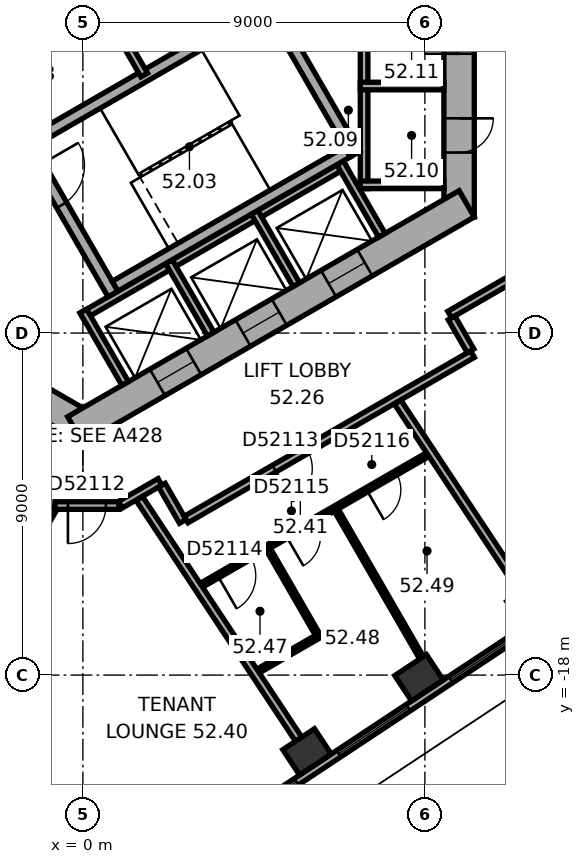
"""IFC4 building model, lengths in metres.
Left out: names, types, materials, properties, quantities, classifications, styles, units other than length and angle.
Written with IfcOpenShell. Run it as: python <this file> out.ifc"""

import sys

from ifc_helpers import new_model, si_unit, direction, frame, frame_2d, origin, origin_2d, place, context, subcontext, project, spatial, rectangle, extrude, element, fill, save


model = new_model("IFC4")
c1 = context("Model", 3, precision=1e-05, world=origin(), true_north=direction((0.0, 1.0)))
c2 = subcontext(c1, "Body", "Model", "MODEL_VIEW")
j1 = project(units=[si_unit("LENGTHUNIT", "METRE"), si_unit("PLANEANGLEUNIT", "RADIAN")], contexts=[c1])
p1 = place(None, origin())
s1 = spatial("IfcSite", under=j1, at=p1, CompositionType="ELEMENT")
p2 = place(p1, origin())
s2 = spatial("IfcBuilding", under=s1, at=p2, CompositionType="ELEMENT")
p3 = place(p2, frame((0.0, 0.0, 210.6)))
s3 = spatial("IfcBuildingStorey", under=s2, at=p3, CompositionType="ELEMENT", Elevation=210.6)
for number, where, z_axis, x_axis in (
    (1, (5.898, -20.021, 0.0), (0.0, 0.0, 1.0), (0.834, 0.552, 0.0)),
    (2, (8.844, -18.07, 0.0), (0.0, 0.0, 1.0), (0.834, 0.552, 0.0)),
):
    element("IfcColumn", number, at=place(p3, frame(where, z_axis=z_axis, x_axis=x_axis)), inside=s3, PredefinedType="COLUMN", context=c2, shape_type="SweptSolid", body=[
        extrude(rectangle(XDim=1.0, YDim=0.8, at=origin_2d()), origin(), (0.0, 0.0, 1.0), 3.7),
    ])
p4 = place(p3, frame((9.9, -5.947, 0.0), z_axis=(0.0, 0.0, 1.0), x_axis=(0.0, 1.0, 0.0)))
e3 = element("IfcWall", 3, at=p4, inside=s3, PredefinedType="SHEAR", context=c2, shape_type="SweptSolid", body=[
    extrude(rectangle(XDim=11.894, YDim=0.8, at=frame_2d((5.947, 0.0))), origin(), (0.0, 0.0, 1.0), 3.7),
])
p5 = place(p4, frame((6.147, 0.0, 0.0)))
e4 = element("IfcOpeningElement", 4, at=p5, cuts=e3, PredefinedType="OPENING", context=c2, shape_type="SweptSolid", body=[
    extrude(rectangle(XDim=1.5, YDim=2.1, at=frame_2d((0.75, 1.05))), frame((0.0, 0.41, 0.0), z_axis=(0.0, -1.0, 0.0), x_axis=(1.0, 0.0, 0.0)), (0.0, 0.0, 1.0), 0.82),
])
p6 = place(p4, frame((1.697, 0.0, 0.0)))
e5 = element("IfcOpeningElement", 5, at=p6, cuts=e3, PredefinedType="OPENING", context=c2, shape_type="SweptSolid", body=[
    extrude(rectangle(XDim=0.9, YDim=2.1, at=frame_2d((0.45, 1.05))), frame((0.0, 0.41, 0.0), z_axis=(0.0, -1.0, 0.0), x_axis=(1.0, 0.0, 0.0)), (0.0, 0.0, 1.0), 0.82),
])
p7 = place(p4, frame((4.297, 0.0, 0.0)))
e6 = element("IfcOpeningElement", 6, at=p7, cuts=e3, PredefinedType="OPENING", context=c2, shape_type="SweptSolid", body=[
    extrude(rectangle(XDim=0.9, YDim=2.1, at=frame_2d((0.45, 1.05))), frame((0.0, 0.41, 0.0), z_axis=(0.0, -1.0, 0.0), x_axis=(1.0, 0.0, 0.0)), (0.0, 0.0, 1.0), 0.82),
])
p8 = place(p3, frame((-10.1, -5.6, 0.0), z_axis=(0.0, 0.0, 1.0), x_axis=(0.866023897231, -0.500002609418, 0.0)))
e7 = element("IfcWall", 7, at=p8, inside=s3, PredefinedType="SHEAR", context=c2, shape_type="SweptSolid", body=[
    extrude(rectangle(XDim=11.894, YDim=0.8, at=frame_2d((5.947, 0.0))), origin(), (0.0, 0.0, 1.0), 3.7),
])
p9 = place(p8, frame((6.147, 0.0, 0.0)))
e8 = element("IfcOpeningElement", 8, at=p9, cuts=e7, PredefinedType="OPENING", context=c2, shape_type="SweptSolid", body=[
    extrude(rectangle(XDim=1.5, YDim=2.1, at=frame_2d((0.75, 1.05))), frame((0.0, 0.41, 0.0), z_axis=(0.0, -1.0, 0.0), x_axis=(1.0, 0.0, 0.0)), (0.0, 0.0, 1.0), 0.82),
])
p10 = place(p8, frame((1.597, 0.0, 0.0)))
e9 = element("IfcOpeningElement", 9, at=p10, cuts=e7, PredefinedType="OPENING", context=c2, shape_type="SweptSolid", body=[
    extrude(rectangle(XDim=1.1, YDim=2.1, at=frame_2d((0.55, 1.05))), frame((0.0, 0.41, 0.0), z_axis=(0.0, -1.0, 0.0), x_axis=(1.0, 0.0, 0.0)), (0.0, 0.0, 1.0), 0.82),
])
p11 = place(p8, frame((4.197, 0.0, 0.0)))
e10 = element("IfcOpeningElement", 10, at=p11, cuts=e7, PredefinedType="OPENING", context=c2, shape_type="SweptSolid", body=[
    extrude(rectangle(XDim=1.1, YDim=2.1, at=frame_2d((0.55, 1.05))), frame((0.0, 0.41, 0.0), z_axis=(0.0, -1.0, 0.0), x_axis=(1.0, 0.0, 0.0)), (0.0, 0.0, 1.0), 0.82),
])
p12 = place(p3, frame((-0.2, -11.547, 0.0), z_axis=(0.0, 0.0, 1.0), x_axis=(0.866023897231, 0.500002609418, 0.0)))
e11 = element("IfcWall", 11, at=p12, inside=s3, PredefinedType="SHEAR", context=c2, shape_type="SweptSolid", body=[
    extrude(rectangle(XDim=11.894, YDim=0.8, at=frame_2d((5.947, 0.0))), origin(), (0.0, 0.0, 1.0), 3.7),
])
p13 = place(p12, frame((2.497, 0.0, 0.0)))
e12 = element("IfcOpeningElement", 12, at=p13, cuts=e11, PredefinedType="OPENING", context=c2, shape_type="SweptSolid", body=[
    extrude(rectangle(XDim=1.1, YDim=2.1, at=frame_2d((0.55, 1.05))), frame((0.0, 0.41, 0.0), z_axis=(0.0, -1.0, 0.0), x_axis=(1.0, 0.0, 0.0)), (0.0, 0.0, 1.0), 0.82),
])
p14 = place(p12, frame((5.097, 0.0, 0.0)))
e13 = element("IfcOpeningElement", 13, at=p14, cuts=e11, PredefinedType="OPENING", context=c2, shape_type="SweptSolid", body=[
    extrude(rectangle(XDim=1.1, YDim=2.1, at=frame_2d((0.55, 1.05))), frame((0.0, 0.41, 0.0), z_axis=(0.0, -1.0, 0.0), x_axis=(1.0, 0.0, 0.0)), (0.0, 0.0, 1.0), 0.82),
])
p15 = place(p12, frame((7.697, 0.0, 0.0)))
e14 = element("IfcOpeningElement", 14, at=p15, cuts=e11, PredefinedType="OPENING", context=c2, shape_type="SweptSolid", body=[
    extrude(rectangle(XDim=1.1, YDim=2.1, at=frame_2d((0.55, 1.05))), frame((0.0, 0.41, 0.0), z_axis=(0.0, -1.0, 0.0), x_axis=(1.0, 0.0, 0.0)), (0.0, 0.0, 1.0), 0.82),
])
p16 = place(p3, frame((2.739, -22.711, 0.0), z_axis=(0.0, 0.0, 1.0), x_axis=(0.833885723098, 0.551937134838, 0.0)))
e15 = element("IfcWall", 15, at=p16, inside=s3, PredefinedType="STANDARD", context=c2, shape_type="SweptSolid", body=[
    extrude(rectangle(XDim=18.841, YDim=0.2, at=frame_2d((9.421, 0.0))), origin(), (0.0, 0.0, 1.0), 3.7),
])
p17 = place(p16, frame((1.252, 0.0, 0.9)))
e16 = element("IfcOpeningElement", 16, at=p17, cuts=e15, PredefinedType="OPENING", context=c2, shape_type="SweptSolid", body=[
    extrude(rectangle(XDim=2.2, YDim=2.0, at=frame_2d((1.1, 1.0))), frame((0.0, 0.11, 0.0), z_axis=(0.0, -1.0, 0.0), x_axis=(1.0, 0.0, 0.0)), (0.0, 0.0, 1.0), 0.22),
])
p18 = place(p16, frame((4.786, 0.0, 0.9)))
e17 = element("IfcOpeningElement", 17, at=p18, cuts=e15, PredefinedType="OPENING", context=c2, shape_type="SweptSolid", body=[
    extrude(rectangle(XDim=2.2, YDim=2.0, at=frame_2d((1.1, 1.0))), frame((0.0, 0.11, 0.0), z_axis=(0.0, -1.0, 0.0), x_axis=(1.0, 0.0, 0.0)), (0.0, 0.0, 1.0), 0.22),
])
p19 = place(p16, frame((8.32, 0.0, 0.9)))
e18 = element("IfcOpeningElement", 18, at=p19, cuts=e15, PredefinedType="OPENING", context=c2, shape_type="SweptSolid", body=[
    extrude(rectangle(XDim=2.2, YDim=2.0, at=frame_2d((1.1, 1.0))), frame((0.0, 0.11, 0.0), z_axis=(0.0, -1.0, 0.0), x_axis=(1.0, 0.0, 0.0)), (0.0, 0.0, 1.0), 0.22),
])
p20 = place(p16, frame((11.854, 0.0, 0.9)))
e19 = element("IfcOpeningElement", 19, at=p20, cuts=e15, PredefinedType="OPENING", context=c2, shape_type="SweptSolid", body=[
    extrude(rectangle(XDim=2.2, YDim=2.0, at=frame_2d((1.1, 1.0))), frame((0.0, 0.11, 0.0), z_axis=(0.0, -1.0, 0.0), x_axis=(1.0, 0.0, 0.0)), (0.0, 0.0, 1.0), 0.22),
])
p21 = place(p16, frame((15.387, 0.0, 0.9)))
e20 = element("IfcOpeningElement", 20, at=p21, cuts=e15, PredefinedType="OPENING", context=c2, shape_type="SweptSolid", body=[
    extrude(rectangle(XDim=2.2, YDim=2.0, at=frame_2d((1.1, 1.0))), frame((0.0, 0.11, 0.0), z_axis=(0.0, -1.0, 0.0), x_axis=(1.0, 0.0, 0.0)), (0.0, 0.0, 1.0), 0.22),
])
p22 = place(p3, frame((7.4, -5.2, 0.0), z_axis=(0.0, 0.0, 1.0), x_axis=(0.0, 1.0, 0.0)))
e21 = element("IfcWall", 21, at=p22, inside=s3, PredefinedType="PARTITIONING", context=c2, shape_type="SweptSolid", body=[
    extrude(rectangle(XDim=5.4, YDim=0.2, at=frame_2d((2.7, 0.0))), origin(), (0.0, 0.0, 1.0), 3.35),
])
for number, where, z_axis, x_axis in (
    (22, (7.3, -5.1, 0.0), (0.0, 0.0, 1.0), (1.0, 0.0, 0.0)),
    (23, (7.3, -2.5, 0.0), (0.0, 0.0, 1.0), (1.0, 0.0, 0.0)),
):
    element("IfcWall", number, at=place(p3, frame(where, z_axis=z_axis, x_axis=x_axis)), inside=s3, PredefinedType="PARTITIONING", context=c2, shape_type="SweptSolid", body=[
        extrude(rectangle(XDim=2.2, YDim=0.2, at=frame_2d((1.1, 0.0))), origin(), (0.0, 0.0, 1.0), 3.35),
    ])
p23 = place(p3, frame((-0.024, -8.559, 0.0), z_axis=(0.0, 0.0, 1.0), x_axis=(0.866026010844, 0.49999894854, 0.0)))
e24 = element("IfcWall", 24, at=p23, inside=s3, PredefinedType="PARTITIONING", context=c2, shape_type="SweptSolid", body=[
    extrude(rectangle(XDim=8.0, YDim=0.2, at=frame_2d((4.0, 0.0))), origin(), (0.0, 0.0, 1.0), 3.35),
])
for number, where, z_axis, x_axis in (
    (25, (0.013, -8.422, 0.0), (0.0, 0.0, 1.0), (0.5, -0.866, 0.0)),
    (26, (2.264, -7.122, 0.0), (0.0, 0.0, 1.0), (0.5, -0.866, 0.0)),
    (27, (4.516, -5.822, 0.0), (0.0, 0.0, 1.0), (0.5, -0.866, 0.0)),
    (28, (6.768, -4.522, 0.0), (0.0, 0.0, 1.0), (0.5, -0.866, 0.0)),
):
    element("IfcWall", number, at=place(p3, frame(where, z_axis=z_axis, x_axis=x_axis)), inside=s3, PredefinedType="PARTITIONING", context=c2, shape_type="SweptSolid", body=[
        extrude(rectangle(XDim=2.2, YDim=0.2, at=frame_2d((1.1, 0.0))), origin(), (0.0, 0.0, 1.0), 3.35),
    ])
p24 = place(p3, frame((-1.558, -3.902, 0.0), z_axis=(0.0, 0.0, 1.0), x_axis=(0.499977259774, -0.866038532462, 0.0)))
e29 = element("IfcWall", 29, at=p24, inside=s3, PredefinedType="SHEAR", context=c2, shape_type="SweptSolid", body=[
    extrude(rectangle(XDim=4.7, YDim=0.3, at=frame_2d((2.35, 0.0))), origin(), (0.0, 0.0, 1.0), 3.35),
])
p25 = place(p24, frame((0.8, 0.0, 0.0)))
e30 = element("IfcOpeningElement", 30, at=p25, cuts=e29, PredefinedType="OPENING", context=c2, shape_type="SweptSolid", body=[
    extrude(rectangle(XDim=1.2, YDim=2.1, at=frame_2d((0.6, 1.05))), frame((0.0, 0.16, 0.0), z_axis=(0.0, -1.0, 0.0), x_axis=(1.0, 0.0, 0.0)), (0.0, 0.0, 1.0), 0.32),
])
p26 = place(p3, frame((4.816, -0.222, 0.0), z_axis=(0.0, 0.0, 1.0), x_axis=(0.499977259774, -0.866038532462, 0.0)))
e31 = element("IfcWall", 31, at=p26, inside=s3, PredefinedType="SHEAR", context=c2, shape_type="SweptSolid", body=[
    extrude(rectangle(XDim=4.7, YDim=0.3, at=frame_2d((2.35, 0.0))), origin(), (0.0, 0.0, 1.0), 3.35),
])
for number, where, z_axis, x_axis in (
    (32, (-1.353, -3.957, 0.0), (0.0, 0.0, 1.0), (0.866, 0.5, 0.0)),
    (33, (0.847, -7.767, 0.0), (0.0, 0.0, 1.0), (0.866, 0.5, 0.0)),
):
    element("IfcWall", number, at=place(p3, frame(where, z_axis=z_axis, x_axis=x_axis)), inside=s3, PredefinedType="SHEAR", context=c2, shape_type="SweptSolid", body=[
        extrude(rectangle(XDim=7.06, YDim=0.3, at=frame_2d((3.53, 0.0))), origin(), (0.0, 0.0, 1.0), 3.35),
    ])
p27 = place(p3, frame((0.74, -0.696, 0.0), z_axis=(0.0, 0.0, 1.0), x_axis=(0.499956301907, -0.86605063142, 0.0)))
e34 = element("IfcWall", 34, at=p27, inside=s3, PredefinedType="PARTITIONING", context=c2, shape_type="SweptSolid", body=[
    extrude(rectangle(XDim=1.747, YDim=0.2, at=frame_2d((0.874, 0.0))), origin(), (0.0, 0.0, 1.0), 3.35),
])
p28 = place(p3, frame((-4.465, -19.997, 0.0), z_axis=(0.0, 0.0, 1.0), x_axis=(0.500011802906, 0.866018589266, 0.0)))
e35 = element("IfcWall", 35, at=p28, inside=s3, PredefinedType="PARTITIONING", context=c2, shape_type="SweptSolid", body=[
    extrude(rectangle(XDim=7.377, YDim=0.2, at=frame_2d((3.688, 0.0))), origin(), (0.0, 0.0, 1.0), 3.35),
])
p29 = place(p3, frame((-0.736, -13.539, 0.0), z_axis=(0.0, 0.0, 1.0), x_axis=(1.0, 0.0, 0.0)))
e36 = element("IfcWall", 36, at=p29, inside=s3, PredefinedType="PARTITIONING", context=c2, shape_type="SweptSolid", body=[
    extrude(rectangle(XDim=1.686, YDim=0.2, at=frame_2d((0.843, 0.0))), origin(), (0.0, 0.0, 1.0), 3.35),
])
p30 = place(p29, frame((0.343, 0.0, 0.0)))
e37 = element("IfcOpeningElement", 37, at=p30, cuts=e36, PredefinedType="OPENING", context=c2, shape_type="SweptSolid", body=[
    extrude(rectangle(XDim=1.0, YDim=2.1, at=frame_2d((0.5, 1.05))), frame((0.0, 0.11, 0.0), z_axis=(0.0, -1.0, 0.0), x_axis=(1.0, 0.0, 0.0)), (0.0, 0.0, 1.0), 0.22),
])
p31 = place(p3, frame((0.985, -13.519, 0.0), z_axis=(0.0, 0.0, 1.0), x_axis=(0.866054082991, 0.499950322867, 0.0)))
e38 = element("IfcWall", 38, at=p31, inside=s3, PredefinedType="PARTITIONING", context=c2, shape_type="SweptSolid", body=[
    extrude(rectangle(XDim=1.206, YDim=0.2, at=frame_2d((0.603, 0.0))), origin(), (0.0, 0.0, 1.0), 3.35),
])
p32 = place(p3, frame((2.079, -13.003, 0.0), z_axis=(0.0, 0.0, 1.0), x_axis=(0.500074377092, -0.865982457891, 0.0)))
e39 = element("IfcWall", 39, at=p32, inside=s3, PredefinedType="PARTITIONING", context=c2, shape_type="SweptSolid", body=[
    extrude(rectangle(XDim=1.101, YDim=0.2, at=frame_2d((0.55, 0.0))), origin(), (0.0, 0.0, 1.0), 3.35),
])
p33 = place(p3, frame((2.716, -13.906, 0.0), z_axis=(0.0, 0.0, 1.0), x_axis=(0.866040290674, 0.499974214264, 0.0)))
e40 = element("IfcWall", 40, at=p33, inside=s3, PredefinedType="PARTITIONING", context=c2, shape_type="SweptSolid", body=[
    extrude(rectangle(XDim=8.702, YDim=0.2, at=frame_2d((4.351, 0.0))), origin(), (0.0, 0.0, 1.0), 3.35),
])
p34 = place(p33, frame((2.679, 0.0, 0.0)))
e41 = element("IfcOpeningElement", 41, at=p34, cuts=e40, PredefinedType="OPENING", context=c2, shape_type="SweptSolid", body=[
    extrude(rectangle(XDim=1.0, YDim=2.1, at=frame_2d((0.5, 1.05))), frame((0.0, 0.11, 0.0), z_axis=(0.0, -1.0, 0.0), x_axis=(1.0, 0.0, 0.0)), (0.0, 0.0, 1.0), 0.22),
])
p35 = place(p3, frame((3.117, -15.638, 0.0), z_axis=(0.0, 0.0, 1.0), x_axis=(0.866031365477, 0.499989673903, 0.0)))
e42 = element("IfcWall", 42, at=p35, inside=s3, PredefinedType="PARTITIONING", context=c2, shape_type="SweptSolid", body=[
    extrude(rectangle(XDim=6.881, YDim=0.12, at=frame_2d((3.44, 0.0))), origin(), (0.0, 0.0, 1.0), 3.35),
])
p36 = place(p35, frame((0.5, 0.0, 0.0)))
e43 = element("IfcOpeningElement", 43, at=p36, cuts=e42, PredefinedType="OPENING", context=c2, shape_type="SweptSolid", body=[
    extrude(rectangle(XDim=1.0, YDim=2.1, at=frame_2d((0.5, 1.05))), frame((0.0, 0.07, 0.0), z_axis=(0.0, -1.0, 0.0), x_axis=(1.0, 0.0, 0.0)), (0.0, 0.0, 1.0), 0.14),
])
p37 = place(p35, frame((2.583, 0.0, 0.0)))
e44 = element("IfcOpeningElement", 44, at=p37, cuts=e42, PredefinedType="OPENING", context=c2, shape_type="SweptSolid", body=[
    extrude(rectangle(XDim=0.9, YDim=2.1, at=frame_2d((0.45, 1.05))), frame((0.0, 0.07, 0.0), z_axis=(0.0, -1.0, 0.0), x_axis=(1.0, 0.0, 0.0)), (0.0, 0.0, 1.0), 0.14),
])
p38 = place(p35, frame((5.023, 0.0, 0.0)))
e45 = element("IfcOpeningElement", 45, at=p38, cuts=e42, PredefinedType="OPENING", context=c2, shape_type="SweptSolid", body=[
    extrude(rectangle(XDim=0.9, YDim=2.1, at=frame_2d((0.45, 1.05))), frame((0.0, 0.07, 0.0), z_axis=(0.0, -1.0, 0.0), x_axis=(1.0, 0.0, 0.0)), (0.0, 0.0, 1.0), 0.14),
])
p39 = place(p3, frame((4.61, -17.893, 0.0), z_axis=(0.0, 0.0, 1.0), x_axis=(0.866023842607, 0.500002704028, 0.0)))
e46 = element("IfcWall", 46, at=p39, inside=s3, PredefinedType="PARTITIONING", context=c2, shape_type="SweptSolid", body=[
    extrude(rectangle(XDim=1.835, YDim=0.12, at=frame_2d((0.917, 0.0))), origin(), (0.0, 0.0, 1.0), 3.35),
])
p40 = place(p3, frame((5.677, -19.687, 0.0), z_axis=(0.0, 0.0, 1.0), x_axis=(-0.551936619203, 0.833886064389, 0.0)))
e47 = element("IfcWall", 47, at=p40, inside=s3, PredefinedType="PARTITIONING", context=c2, shape_type="SweptSolid", body=[
    extrude(rectangle(XDim=7.592, YDim=0.2, at=frame_2d((3.796, 0.0))), origin(), (0.0, 0.0, 1.0), 3.35),
])
p41 = place(p3, frame((6.169, -16.924, 0.0), z_axis=(0.0, 0.0, 1.0), x_axis=(-0.500047388771, 0.865998042136, 0.0)))
e48 = element("IfcWall", 48, at=p41, inside=s3, PredefinedType="PARTITIONING", context=c2, shape_type="SweptSolid", body=[
    extrude(rectangle(XDim=2.58, YDim=0.12, at=frame_2d((1.29, 0.0))), origin(), (0.0, 0.0, 1.0), 3.35),
])
p42 = place(p3, frame((8.912, -17.545, 0.0), z_axis=(0.0, 0.0, 1.0), x_axis=(-0.500022113525, 0.866012636158, 0.0)))
e49 = element("IfcWall", 49, at=p42, inside=s3, PredefinedType="PARTITIONING", context=c2, shape_type="SweptSolid", body=[
    extrude(rectangle(XDim=4.49, YDim=0.12, at=frame_2d((2.245, 0.0))), origin(), (0.0, 0.0, 1.0), 2.65),
])
p43 = place(p3, frame((9.652, -8.515, 0.0), z_axis=(0.0, 0.0, 1.0), x_axis=(0.866020375458, 0.500008709215, 0.0)))
e50 = element("IfcWall", 50, at=p43, inside=s3, PredefinedType="PARTITIONING", context=c2, shape_type="SweptSolid", body=[
    extrude(rectangle(XDim=1.846, YDim=0.2, at=frame_2d((0.923, 0.0))), origin(), (0.0, 0.0, 1.0), 3.35),
])
p44 = place(p3, frame((10.202, -9.469, 0.0), z_axis=(0.0, 0.0, 1.0), x_axis=(-0.499968756647, 0.866043441391, 0.0)))
e51 = element("IfcWall", 51, at=p44, inside=s3, PredefinedType="PARTITIONING", context=c2, shape_type="SweptSolid", body=[
    extrude(rectangle(XDim=1.001, YDim=0.2, at=frame_2d((0.5, 0.0))), origin(), (0.0, 0.0, 1.0), 3.35),
])
p45 = place(p3, frame((11.571, -15.786, 0.0), z_axis=(0.0, 0.0, 1.0), x_axis=(-0.551944861763, 0.833880608705, 0.0)))
e52 = element("IfcWall", 52, at=p45, inside=s3, PredefinedType="PARTITIONING", context=c2, shape_type="SweptSolid", body=[
    extrude(rectangle(XDim=5.957, YDim=0.2, at=frame_2d((2.979, 0.0))), origin(), (0.0, 0.0, 1.0), 3.35),
])
p46 = place(p17, origin())
e53 = element("IfcWindow", 53, at=p46, inside=s3, PartitioningType="SINGLE_PANEL", PredefinedType="WINDOW", context=c2, shape_type="SweptSolid", body=[
    extrude(rectangle(XDim=2.2, YDim=2.0, at=frame_2d((1.1, 1.0))), frame((0.0, 0.03, 0.0), z_axis=(0.0, -1.0, 0.0), x_axis=(1.0, 0.0, 0.0)), (0.0, 0.0, 1.0), 0.06),
])
fill(e16, e53)
p47 = place(p18, origin())
e54 = element("IfcWindow", 54, at=p47, inside=s3, PartitioningType="SINGLE_PANEL", PredefinedType="WINDOW", context=c2, shape_type="SweptSolid", body=[
    extrude(rectangle(XDim=2.2, YDim=2.0, at=frame_2d((1.1, 1.0))), frame((0.0, 0.03, 0.0), z_axis=(0.0, -1.0, 0.0), x_axis=(1.0, 0.0, 0.0)), (0.0, 0.0, 1.0), 0.06),
])
fill(e17, e54)
p48 = place(p19, origin())
e55 = element("IfcWindow", 55, at=p48, inside=s3, PartitioningType="SINGLE_PANEL", PredefinedType="WINDOW", context=c2, shape_type="SweptSolid", body=[
    extrude(rectangle(XDim=2.2, YDim=2.0, at=frame_2d((1.1, 1.0))), frame((0.0, 0.03, 0.0), z_axis=(0.0, -1.0, 0.0), x_axis=(1.0, 0.0, 0.0)), (0.0, 0.0, 1.0), 0.06),
])
fill(e18, e55)
p49 = place(p25, origin())
e56 = element("IfcDoor", 56, at=p49, inside=s3, OperationType="SINGLE_SWING_RIGHT", PredefinedType="DOOR", context=c2, shape_type="SweptSolid", body=[
    extrude(rectangle(XDim=1.2, YDim=2.1, at=frame_2d((0.6, 1.05))), frame((0.0, 0.025, 0.0), z_axis=(0.0, -1.0, 0.0), x_axis=(1.0, 0.0, 0.0)), (0.0, 0.0, 1.0), 0.05),
])
fill(e30, e56)
p50 = place(p6, origin())
e57 = element("IfcDoor", 57, at=p50, inside=s3, OperationType="SINGLE_SWING_LEFT", PredefinedType="DOOR", context=c2, shape_type="SweptSolid", body=[
    extrude(rectangle(XDim=0.9, YDim=2.1, at=frame_2d((0.45, 1.05))), frame((0.0, 0.025, 0.0), z_axis=(0.0, -1.0, 0.0), x_axis=(1.0, 0.0, 0.0)), (0.0, 0.0, 1.0), 0.05),
])
fill(e5, e57)
p51 = place(p7, origin())
e58 = element("IfcDoor", 58, at=p51, inside=s3, OperationType="SINGLE_SWING_LEFT", PredefinedType="DOOR", context=c2, shape_type="SweptSolid", body=[
    extrude(rectangle(XDim=0.9, YDim=2.1, at=frame_2d((0.45, 1.05))), frame((0.0, 0.025, 0.0), z_axis=(0.0, -1.0, 0.0), x_axis=(1.0, 0.0, 0.0)), (0.0, 0.0, 1.0), 0.05),
])
fill(e6, e58)
p52 = place(p13, origin())
e59 = element("IfcDoor", 59, at=p52, inside=s3, OperationType="DOUBLE_DOOR_SLIDING", PredefinedType="DOOR", context=c2, shape_type="SweptSolid", body=[
    extrude(rectangle(XDim=1.1, YDim=2.1, at=frame_2d((0.55, 1.05))), frame((0.0, 0.025, 0.0), z_axis=(0.0, -1.0, 0.0), x_axis=(1.0, 0.0, 0.0)), (0.0, 0.0, 1.0), 0.05),
])
fill(e12, e59)
p53 = place(p14, origin())
e60 = element("IfcDoor", 60, at=p53, inside=s3, OperationType="DOUBLE_DOOR_SLIDING", PredefinedType="DOOR", context=c2, shape_type="SweptSolid", body=[
    extrude(rectangle(XDim=1.1, YDim=2.1, at=frame_2d((0.55, 1.05))), frame((0.0, 0.025, 0.0), z_axis=(0.0, -1.0, 0.0), x_axis=(1.0, 0.0, 0.0)), (0.0, 0.0, 1.0), 0.05),
])
fill(e13, e60)
p54 = place(p15, origin())
e61 = element("IfcDoor", 61, at=p54, inside=s3, OperationType="DOUBLE_DOOR_SLIDING", PredefinedType="DOOR", context=c2, shape_type="SweptSolid", body=[
    extrude(rectangle(XDim=1.1, YDim=2.1, at=frame_2d((0.55, 1.05))), frame((0.0, 0.025, 0.0), z_axis=(0.0, -1.0, 0.0), x_axis=(1.0, 0.0, 0.0)), (0.0, 0.0, 1.0), 0.05),
])
fill(e14, e61)
p55 = place(p30, origin())
e62 = element("IfcDoor", 62, at=p55, inside=s3, OperationType="SINGLE_SWING_LEFT", PredefinedType="DOOR", context=c2, shape_type="SweptSolid", body=[
    extrude(rectangle(XDim=1.0, YDim=2.1, at=frame_2d((0.5, 1.05))), frame((0.0, 0.025, 0.0), z_axis=(0.0, -1.0, 0.0), x_axis=(1.0, 0.0, 0.0)), (0.0, 0.0, 1.0), 0.05),
])
fill(e37, e62)
p56 = place(p34, origin())
e63 = element("IfcDoor", 63, at=p56, inside=s3, OperationType="SINGLE_SWING_LEFT", PredefinedType="DOOR", context=c2, shape_type="SweptSolid", body=[
    extrude(rectangle(XDim=1.0, YDim=2.1, at=frame_2d((0.5, 1.05))), frame((0.0, 0.025, 0.0), z_axis=(0.0, -1.0, 0.0), x_axis=(1.0, 0.0, 0.0)), (0.0, 0.0, 1.0), 0.05),
])
fill(e41, e63)
p57 = place(p36, origin())
e64 = element("IfcDoor", 64, at=p57, inside=s3, OperationType="SINGLE_SWING_LEFT", PredefinedType="DOOR", context=c2, shape_type="SweptSolid", body=[
    extrude(rectangle(XDim=1.0, YDim=2.1, at=frame_2d((0.5, 1.05))), frame((0.0, 0.025, 0.0), z_axis=(0.0, -1.0, 0.0), x_axis=(1.0, 0.0, 0.0)), (0.0, 0.0, 1.0), 0.05),
])
fill(e43, e64)
p58 = place(p37, origin())
e65 = element("IfcDoor", 65, at=p58, inside=s3, OperationType="SINGLE_SWING_LEFT", PredefinedType="DOOR", context=c2, shape_type="SweptSolid", body=[
    extrude(rectangle(XDim=0.9, YDim=2.1, at=frame_2d((0.45, 1.05))), frame((0.0, 0.025, 0.0), z_axis=(0.0, -1.0, 0.0), x_axis=(1.0, 0.0, 0.0)), (0.0, 0.0, 1.0), 0.05),
])
fill(e44, e65)
p59 = place(p38, origin())
e66 = element("IfcDoor", 66, at=p59, inside=s3, OperationType="SINGLE_SWING_LEFT", PredefinedType="DOOR", context=c2, shape_type="SweptSolid", body=[
    extrude(rectangle(XDim=0.9, YDim=2.1, at=frame_2d((0.45, 1.05))), frame((0.0, 0.025, 0.0), z_axis=(0.0, -1.0, 0.0), x_axis=(1.0, 0.0, 0.0)), (0.0, 0.0, 1.0), 0.05),
])
fill(e45, e66)
save(model, sys.argv[1])
